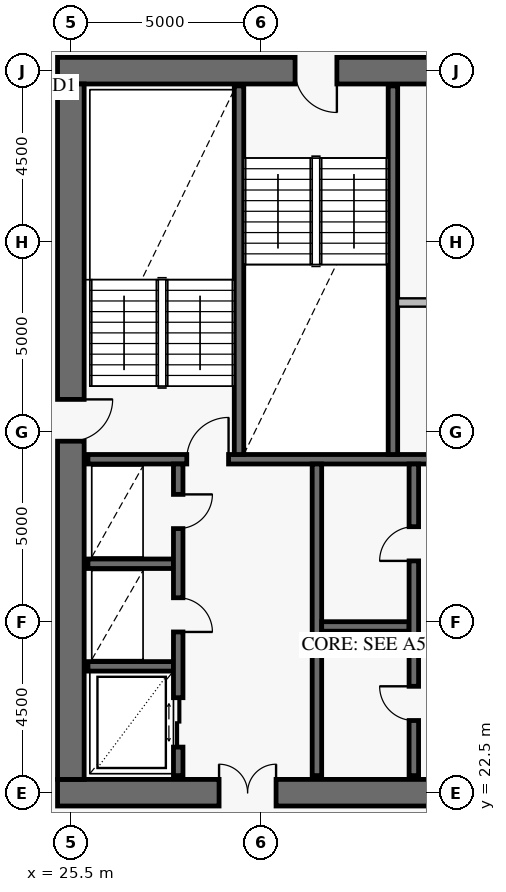
"""IFC4 building model, lengths in metres.
Left out: names, types, materials, properties, quantities, classifications, styles, units other than length and angle.
Written with IfcOpenShell. Run it as: python <this file> out.ifc"""

import sys

from ifc_helpers import new_model, si_unit, direction, frame, frame_2d, origin, place, context, subcontext, project, spatial, rectangle, extrude, element, fill, save


model = new_model("IFC4")
c1 = context("Model", 3, precision=1e-05, world=origin(), true_north=direction((0.0, 1.0)))
c2 = subcontext(c1, "Body", "Model", "MODEL_VIEW")
j1 = project(units=[si_unit("LENGTHUNIT", "METRE"), si_unit("PLANEANGLEUNIT", "RADIAN")], contexts=[c1])
p1 = place(None, origin())
s1 = spatial("IfcSite", under=j1, at=p1, CompositionType="ELEMENT")
p2 = place(p1, origin())
s2 = spatial("IfcBuilding", under=s1, at=p2, CompositionType="ELEMENT")
p3 = place(p2, frame((0.0, 0.0, 218.8)))
s3 = spatial("IfcBuildingStorey", under=s2, at=p3, CompositionType="ELEMENT", Elevation=218.8)
p4 = place(p3, frame((25.15, 22.5, 0.0), z_axis=(0.0, 0.0, 1.0), x_axis=(1.0, 0.0, 0.0)))
e1 = element("IfcWall", 1, at=p4, inside=s3, PredefinedType="SHEAR", context=c2, shape_type="SweptSolid", body=[
    extrude(rectangle(XDim=9.9, YDim=0.7, at=frame_2d((4.95, 0.0))), origin(), (0.0, 0.0, 1.0), 3.8),
])
p5 = place(p4, frame((4.25, 0.0, 0.0)))
e2 = element("IfcOpeningElement", 2, at=p5, cuts=e1, PredefinedType="OPENING", context=c2, shape_type="SweptSolid", body=[
    extrude(rectangle(XDim=1.5, YDim=2.15, at=frame_2d((0.75, 1.075))), frame((0.0, 0.362, 0.0), z_axis=(0.0, -1.0, 0.0), x_axis=(1.0, 0.0, 0.0)), (0.0, 0.0, 1.0), 0.724),
])
p6 = place(p3, frame((36.75, 41.5, 0.0), z_axis=(0.0, 0.0, 1.0), x_axis=(-1.0, 0.0, 0.0)))
e3 = element("IfcWall", 3, at=p6, inside=s3, PredefinedType="SHEAR", context=c2, shape_type="SweptSolid", body=[
    extrude(rectangle(XDim=11.6, YDim=0.7, at=frame_2d((5.8, 0.0))), origin(), (0.0, 0.0, 1.0), 3.8),
])
p7 = place(p6, frame((4.25, 0.0, 0.0)))
e4 = element("IfcOpeningElement", 4, at=p7, cuts=e3, PredefinedType="OPENING", context=c2, shape_type="SweptSolid", body=[
    extrude(rectangle(XDim=1.1, YDim=2.15, at=frame_2d((0.55, 1.075))), frame((0.0, 0.362, 0.0), z_axis=(0.0, -1.0, 0.0), x_axis=(1.0, 0.0, 0.0)), (0.0, 0.0, 1.0), 0.724),
])
p8 = place(p3, frame((25.5, 22.85, 0.0), z_axis=(0.0, 0.0, 1.0), x_axis=(0.0, 1.0, 0.0)))
e5 = element("IfcWall", 5, at=p8, inside=s3, PredefinedType="SHEAR", context=c2, shape_type="SweptSolid", body=[
    extrude(rectangle(XDim=18.3, YDim=0.7, at=frame_2d((9.15, 0.0))), origin(), (0.0, 0.0, 1.0), 3.8),
])
p9 = place(p8, frame((8.9, 0.0, 0.0)))
e6 = element("IfcOpeningElement", 6, at=p9, cuts=e5, PredefinedType="OPENING", context=c2, shape_type="SweptSolid", body=[
    extrude(rectangle(XDim=1.1, YDim=2.15, at=frame_2d((0.55, 1.075))), frame((0.0, 0.362, 0.0), z_axis=(0.0, -1.0, 0.0), x_axis=(1.0, 0.0, 0.0)), (0.0, 0.0, 1.0), 0.724),
])
p10 = place(p3, frame((25.95, 31.275, 0.0), z_axis=(0.0, 0.0, 1.0), x_axis=(1.0, 0.0, 0.0)))
e7 = element("IfcWall", 7, at=p10, inside=s3, PredefinedType="SOLIDWALL", context=c2, shape_type="SweptSolid", body=[
    extrude(rectangle(XDim=20.1, YDim=0.25, at=frame_2d((10.05, 0.0))), origin(), (0.0, 0.0, 1.0), 3.8),
])
p11 = place(p10, frame((2.6, 0.0, 0.0)))
e8 = element("IfcOpeningElement", 8, at=p11, cuts=e7, PredefinedType="OPENING", context=c2, shape_type="SweptSolid", body=[
    extrude(rectangle(XDim=1.1, YDim=2.15, at=frame_2d((0.55, 1.075))), frame((0.0, 0.137, 0.0), z_axis=(0.0, -1.0, 0.0), x_axis=(1.0, 0.0, 0.0)), (0.0, 0.0, 1.0), 0.274),
])
p12 = place(p10, frame((10.6, 0.0, 0.0)))
e9 = element("IfcOpeningElement", 9, at=p12, cuts=e7, PredefinedType="OPENING", context=c2, shape_type="SweptSolid", body=[
    extrude(rectangle(XDim=1.1, YDim=2.15, at=frame_2d((0.55, 1.075))), frame((0.0, 0.137, 0.0), z_axis=(0.0, -1.0, 0.0), x_axis=(1.0, 0.0, 0.0)), (0.0, 0.0, 1.0), 0.274),
])
p13 = place(p10, frame((16.35, 0.0, 0.0)))
e10 = element("IfcOpeningElement", 10, at=p13, cuts=e7, PredefinedType="OPENING", context=c2, shape_type="SweptSolid", body=[
    extrude(rectangle(XDim=1.1, YDim=2.15, at=frame_2d((0.55, 1.075))), frame((0.0, 0.137, 0.0), z_axis=(0.0, -1.0, 0.0), x_axis=(1.0, 0.0, 0.0)), (0.0, 0.0, 1.0), 0.274),
])
for number, where, z_axis, x_axis in (
    (11, (29.925, 31.4, 0.0), (0.0, 0.0, 1.0), (0.0, 1.0, 0.0)),
    (12, (33.975, 31.4, 0.0), (0.0, 0.0, 1.0), (0.0, 1.0, 0.0)),
):
    element("IfcWall", number, at=place(p3, frame(where, z_axis=z_axis, x_axis=x_axis)), inside=s3, PredefinedType="SOLIDWALL", context=c2, shape_type="SweptSolid", body=[
        extrude(rectangle(XDim=9.7, YDim=0.25, at=frame_2d((4.85, 0.0))), origin(), (0.0, 0.0, 1.0), 3.8),
    ])
for number, where, z_axis, x_axis in (
    (13, (25.95, 25.825, 0.0), (0.0, 0.0, 1.0), (1.0, 0.0, 0.0)),
    (14, (25.95, 28.525, 0.0), (0.0, 0.0, 1.0), (1.0, 0.0, 0.0)),
):
    element("IfcWall", number, at=place(p3, frame(where, z_axis=z_axis, x_axis=x_axis)), inside=s3, PredefinedType="SOLIDWALL", context=c2, shape_type="SweptSolid", body=[
        extrude(rectangle(XDim=2.25, YDim=0.25, at=frame_2d((1.125, 0.0))), origin(), (0.0, 0.0, 1.0), 3.8),
    ])
p14 = place(p3, frame((28.325, 22.95, 0.0), z_axis=(0.0, 0.0, 1.0), x_axis=(0.0, 1.0, 0.0)))
e15 = element("IfcWall", 15, at=p14, inside=s3, PredefinedType="SOLIDWALL", context=c2, shape_type="SweptSolid", body=[
    extrude(rectangle(XDim=8.2, YDim=0.25, at=frame_2d((4.1, 0.0))), origin(), (0.0, 0.0, 1.0), 3.8),
])
p15 = place(p14, frame((0.75, 0.0, 0.0)))
e16 = element("IfcOpeningElement", 16, at=p15, cuts=e15, PredefinedType="OPENING", context=c2, shape_type="SweptSolid", body=[
    extrude(rectangle(XDim=1.3, YDim=2.3, at=frame_2d((0.65, 1.15))), frame((0.0, 0.137, 0.0), z_axis=(0.0, -1.0, 0.0), x_axis=(1.0, 0.0, 0.0)), (0.0, 0.0, 1.0), 0.274),
])
p16 = place(p14, frame((3.78, 0.0, 0.0)))
e17 = element("IfcOpeningElement", 17, at=p16, cuts=e15, PredefinedType="OPENING", context=c2, shape_type="SweptSolid", body=[
    extrude(rectangle(XDim=0.9, YDim=2.1, at=frame_2d((0.45, 1.05))), frame((0.0, 0.137, 0.0), z_axis=(0.0, -1.0, 0.0), x_axis=(1.0, 0.0, 0.0)), (0.0, 0.0, 1.0), 0.274),
])
p17 = place(p14, frame((6.5, 0.0, 0.0)))
e18 = element("IfcOpeningElement", 18, at=p17, cuts=e15, PredefinedType="OPENING", context=c2, shape_type="SweptSolid", body=[
    extrude(rectangle(XDim=0.9, YDim=2.1, at=frame_2d((0.45, 1.05))), frame((0.0, 0.137, 0.0), z_axis=(0.0, -1.0, 0.0), x_axis=(1.0, 0.0, 0.0)), (0.0, 0.0, 1.0), 0.274),
])
p18 = place(p3, frame((31.975, 22.95, 0.0), z_axis=(0.0, 0.0, 1.0), x_axis=(0.0, 1.0, 0.0)))
e19 = element("IfcWall", 19, at=p18, inside=s3, PredefinedType="SOLIDWALL", context=c2, shape_type="SweptSolid", body=[
    extrude(rectangle(XDim=8.2, YDim=0.25, at=frame_2d((4.1, 0.0))), origin(), (0.0, 0.0, 1.0), 3.8),
])
p19 = place(p3, frame((32.1, 26.875, 0.0), z_axis=(0.0, 0.0, 1.0), x_axis=(1.0, 0.0, 0.0)))
e20 = element("IfcWall", 20, at=p19, inside=s3, PredefinedType="SOLIDWALL", context=c2, shape_type="SweptSolid", body=[
    extrude(rectangle(XDim=2.3, YDim=0.25, at=frame_2d((1.15, 0.0))), origin(), (0.0, 0.0, 1.0), 3.8),
])
p20 = place(p3, frame((34.525, 22.95, 0.0), z_axis=(0.0, 0.0, 1.0), x_axis=(0.0, 1.0, 0.0)))
e21 = element("IfcWall", 21, at=p20, inside=s3, PredefinedType="SOLIDWALL", context=c2, shape_type="SweptSolid", body=[
    extrude(rectangle(XDim=8.2, YDim=0.25, at=frame_2d((4.1, 0.0))), origin(), (0.0, 0.0, 1.0), 3.8),
])
p21 = place(p20, frame((1.45, 0.0, 0.0)))
e22 = element("IfcOpeningElement", 22, at=p21, cuts=e21, PredefinedType="OPENING", context=c2, shape_type="SweptSolid", body=[
    extrude(rectangle(XDim=0.9, YDim=2.1, at=frame_2d((0.45, 1.05))), frame((0.0, 0.137, 0.0), z_axis=(0.0, -1.0, 0.0), x_axis=(1.0, 0.0, 0.0)), (0.0, 0.0, 1.0), 0.274),
])
p22 = place(p20, frame((5.65, 0.0, 0.0)))
e23 = element("IfcOpeningElement", 23, at=p22, cuts=e21, PredefinedType="OPENING", context=c2, shape_type="SweptSolid", body=[
    extrude(rectangle(XDim=0.9, YDim=2.1, at=frame_2d((0.45, 1.05))), frame((0.0, 0.137, 0.0), z_axis=(0.0, -1.0, 0.0), x_axis=(1.0, 0.0, 0.0)), (0.0, 0.0, 1.0), 0.274),
])
p23 = place(p3, frame((34.108, 35.4, 0.0), z_axis=(0.0, 0.0, 1.0), x_axis=(1.0, 0.0, 0.0)))
e24 = element("IfcWall", 24, at=p23, inside=s3, PredefinedType="PARTITIONING", context=c2, shape_type="SweptSolid", body=[
    extrude(rectangle(XDim=2.084, YDim=0.22, at=frame_2d((1.042, 0.0))), origin(), (0.0, 0.0, 1.0), 3.55),
])
p24 = place(p9, frame((1.1, 0.0, 0.0), z_axis=(0.0, 0.0, 1.0), x_axis=(-1.0, 0.0, 0.0)))
e25 = element("IfcDoor", 25, at=p24, inside=s3, OperationType="SINGLE_SWING_LEFT", PredefinedType="USERDEFINED", context=c2, shape_type="SweptSolid", body=[
    extrude(rectangle(XDim=1.1, YDim=2.15, at=frame_2d((0.55, 1.075))), frame((0.0, 0.025, 0.0), z_axis=(0.0, -1.0, 0.0), x_axis=(1.0, 0.0, 0.0)), (0.0, 0.0, 1.0), 0.05),
])
fill(e6, e25)
p25 = place(p7, origin())
e26 = element("IfcDoor", 26, at=p25, inside=s3, OperationType="SINGLE_SWING_LEFT", PredefinedType="USERDEFINED", context=c2, shape_type="SweptSolid", body=[
    extrude(rectangle(XDim=1.1, YDim=2.15, at=frame_2d((0.55, 1.075))), frame((0.0, 0.025, 0.0), z_axis=(0.0, -1.0, 0.0), x_axis=(1.0, 0.0, 0.0)), (0.0, 0.0, 1.0), 0.05),
])
fill(e4, e26)
p26 = place(p5, origin())
e27 = element("IfcDoor", 27, at=p26, inside=s3, OperationType="DOUBLE_DOOR_SINGLE_SWING", PredefinedType="DOOR", context=c2, shape_type="SweptSolid", body=[
    extrude(rectangle(XDim=1.5, YDim=2.15, at=frame_2d((0.75, 1.075))), frame((0.0, 0.025, 0.0), z_axis=(0.0, -1.0, 0.0), x_axis=(1.0, 0.0, 0.0)), (0.0, 0.0, 1.0), 0.05),
])
fill(e2, e27)
p27 = place(p11, origin())
e28 = element("IfcDoor", 28, at=p27, inside=s3, OperationType="SINGLE_SWING_RIGHT", PredefinedType="USERDEFINED", context=c2, shape_type="SweptSolid", body=[
    extrude(rectangle(XDim=1.1, YDim=2.15, at=frame_2d((0.55, 1.075))), frame((0.0, 0.025, 0.0), z_axis=(0.0, -1.0, 0.0), x_axis=(1.0, 0.0, 0.0)), (0.0, 0.0, 1.0), 0.05),
])
fill(e8, e28)
p28 = place(p15, frame((1.3, 0.0, 0.0), z_axis=(0.0, 0.0, 1.0), x_axis=(-1.0, 0.0, 0.0)))
e29 = element("IfcDoor", 29, at=p28, inside=s3, OperationType="DOUBLE_DOOR_SLIDING", PredefinedType="DOOR", context=c2, shape_type="SweptSolid", body=[
    extrude(rectangle(XDim=1.3, YDim=2.3, at=frame_2d((0.65, 1.15))), frame((0.0, 0.025, 0.0), z_axis=(0.0, -1.0, 0.0), x_axis=(1.0, 0.0, 0.0)), (0.0, 0.0, 1.0), 0.05),
])
fill(e16, e29)
p29 = place(p16, frame((0.9, 0.0, 0.0), z_axis=(0.0, 0.0, 1.0), x_axis=(-1.0, 0.0, 0.0)))
e30 = element("IfcDoor", 30, at=p29, inside=s3, OperationType="SINGLE_SWING_RIGHT", PredefinedType="DOOR", context=c2, shape_type="SweptSolid", body=[
    extrude(rectangle(XDim=0.9, YDim=2.1, at=frame_2d((0.45, 1.05))), frame((0.0, 0.025, 0.0), z_axis=(0.0, -1.0, 0.0), x_axis=(1.0, 0.0, 0.0)), (0.0, 0.0, 1.0), 0.05),
])
fill(e17, e30)
p30 = place(p17, frame((0.9, 0.0, 0.0), z_axis=(0.0, 0.0, 1.0), x_axis=(-1.0, 0.0, 0.0)))
e31 = element("IfcDoor", 31, at=p30, inside=s3, OperationType="SINGLE_SWING_LEFT", PredefinedType="DOOR", context=c2, shape_type="SweptSolid", body=[
    extrude(rectangle(XDim=0.9, YDim=2.1, at=frame_2d((0.45, 1.05))), frame((0.0, 0.025, 0.0), z_axis=(0.0, -1.0, 0.0), x_axis=(1.0, 0.0, 0.0)), (0.0, 0.0, 1.0), 0.05),
])
fill(e18, e31)
p31 = place(p21, origin())
e32 = element("IfcDoor", 32, at=p31, inside=s3, OperationType="SINGLE_SWING_RIGHT", PredefinedType="DOOR", context=c2, shape_type="SweptSolid", body=[
    extrude(rectangle(XDim=0.9, YDim=2.1, at=frame_2d((0.45, 1.05))), frame((0.0, 0.025, 0.0), z_axis=(0.0, -1.0, 0.0), x_axis=(1.0, 0.0, 0.0)), (0.0, 0.0, 1.0), 0.05),
])
fill(e22, e32)
p32 = place(p22, origin())
e33 = element("IfcDoor", 33, at=p32, inside=s3, OperationType="SINGLE_SWING_LEFT", PredefinedType="DOOR", context=c2, shape_type="SweptSolid", body=[
    extrude(rectangle(XDim=0.9, YDim=2.1, at=frame_2d((0.45, 1.05))), frame((0.0, 0.025, 0.0), z_axis=(0.0, -1.0, 0.0), x_axis=(1.0, 0.0, 0.0)), (0.0, 0.0, 1.0), 0.05),
])
fill(e23, e33)
save(model, sys.argv[1])
